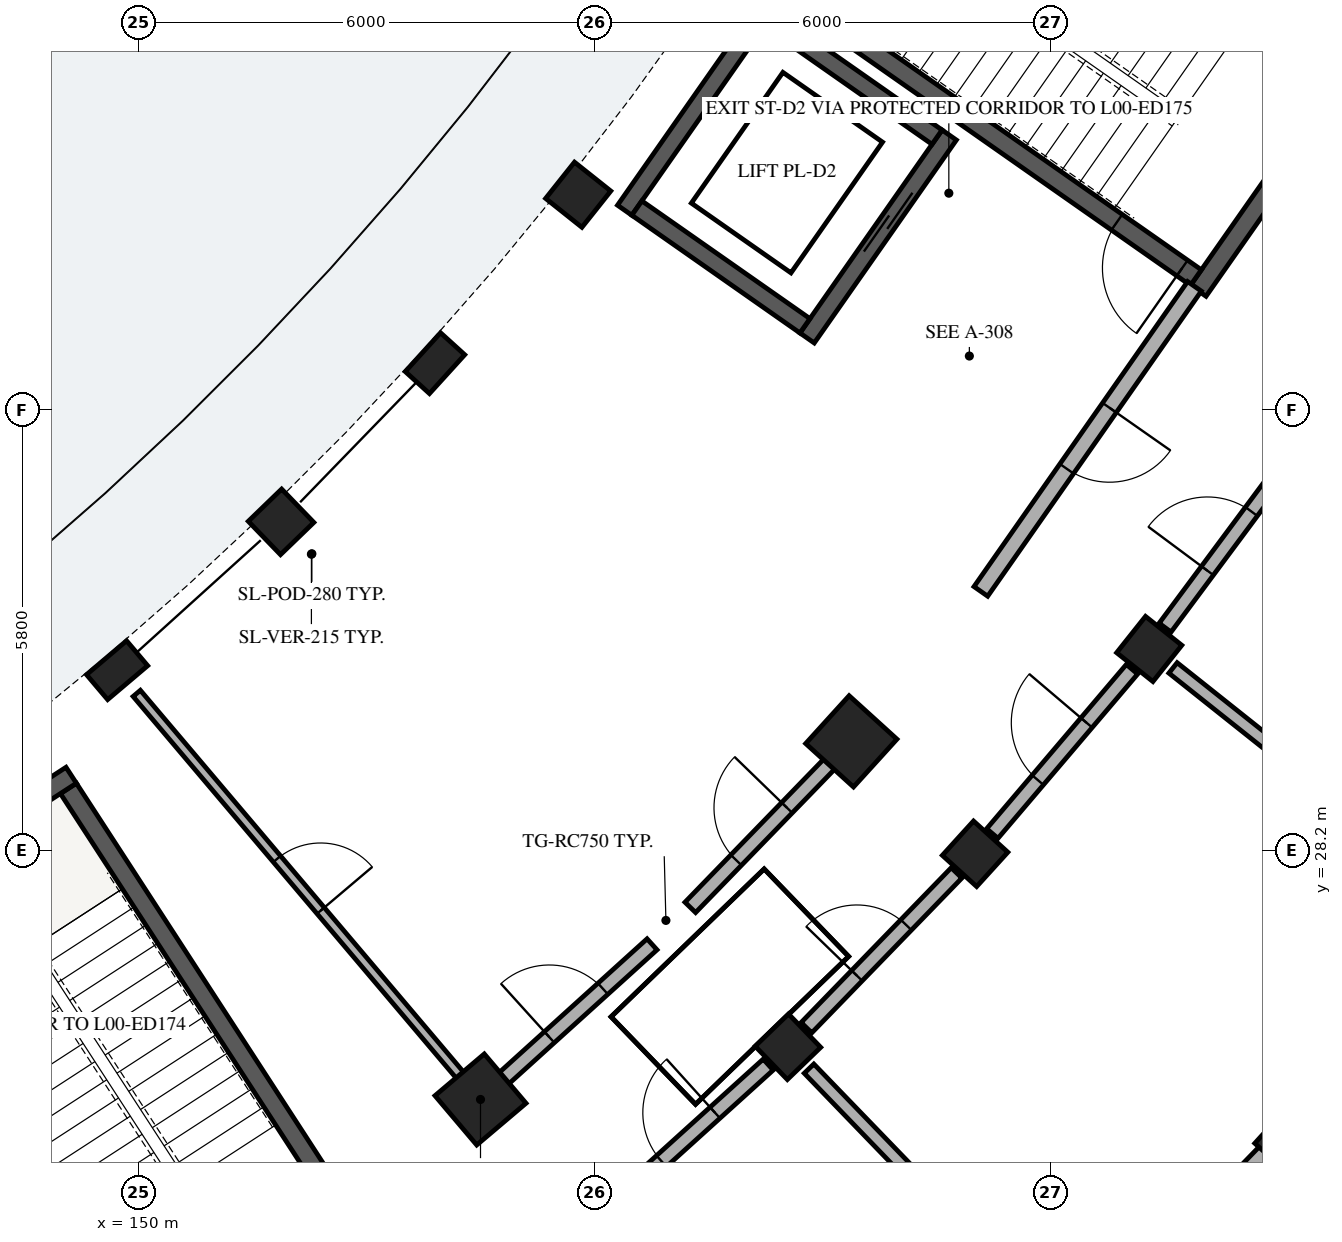
"""IFC4 building model, lengths in metres.
Left out: names, types, materials, properties, quantities, classifications, styles, units other than length and angle.
Written with IfcOpenShell. Run it as: python <this file> out.ifc"""

import sys

from ifc_helpers import new_model, si_unit, direction, frame, frame_2d, origin, origin_2d, place, context, subcontext, project, spatial, rectangle, extrude, element, fill, save


model = new_model("IFC4")
c1 = context("Model", 3, precision=1e-05, world=origin(), true_north=direction((0.0, 1.0)))
c2 = subcontext(c1, "Body", "Model", "MODEL_VIEW")
j1 = project(units=[si_unit("LENGTHUNIT", "METRE"), si_unit("PLANEANGLEUNIT", "RADIAN")], contexts=[c1])
p1 = place(None, origin())
s1 = spatial("IfcSite", under=j1, at=p1, CompositionType="ELEMENT")
p2 = place(p1, origin())
s2 = spatial("IfcBuilding", under=s1, at=p2, CompositionType="ELEMENT")
p3 = place(p2, origin())
s3 = spatial("IfcBuildingStorey", under=s2, at=p3, CompositionType="ELEMENT", Elevation=0.0)
p4 = place(p3, frame((152.674, 23.484, 0.0), z_axis=(0.0, 0.0, 1.0), x_axis=(-0.544655453679, 0.838659905312, 0.0)))
e1 = element("IfcWall", 1, at=p4, inside=s3, PredefinedType="SHEAR", context=c2, shape_type="SweptSolid", body=[
    extrude(rectangle(XDim=6.6, YDim=0.25, at=frame_2d((3.3, 0.0))), origin(), (0.0, 0.0, 1.0), 4.48),
])
p5 = place(p3, frame((149.116, 29.192, 0.0), z_axis=(0.0, 0.0, 1.0), x_axis=(-0.838699580527, -0.544594356953, 0.0)))
e2 = element("IfcWall", 2, at=p5, inside=s3, PredefinedType="SHEAR", context=c2, shape_type="SweptSolid", body=[
    extrude(rectangle(XDim=3.42, YDim=0.25, at=frame_2d((1.71, 0.0))), origin(), (0.0, 0.0, 1.0), 4.48),
])
p6 = place(p3, frame((150.015, 21.757, 0.0), z_axis=(0.0, 0.0, 1.0), x_axis=(-0.544629435258, 0.838676802022, 0.0)))
e3 = element("IfcWall", 3, at=p6, inside=s3, PredefinedType="SHEAR", context=c2, shape_type="SweptSolid", body=[
    extrude(rectangle(XDim=6.6, YDim=0.25, at=frame_2d((3.3, 0.0))), origin(), (0.0, 0.0, 1.0), 4.48),
])
p7 = place(p6, frame((0.22, 0.0, 0.0)))
e4 = element("IfcOpeningElement", 4, at=p7, cuts=e3, PredefinedType="OPENING", context=c2, shape_type="SweptSolid", body=[
    extrude(rectangle(XDim=1.05, YDim=2.15, at=frame_2d((0.525, 1.075))), frame((0.0, 0.135, 0.0), z_axis=(0.0, -1.0, 0.0), x_axis=(1.0, 0.0, 0.0)), (0.0, 0.0, 1.0), 0.27),
])
p8 = place(p3, frame((165.733, 38.336, 0.0), z_axis=(0.0, 0.0, 1.0), x_axis=(-0.819153711596, 0.573574055182, 0.0)))
e5 = element("IfcWall", 5, at=p8, inside=s3, PredefinedType="SHEAR", context=c2, shape_type="SweptSolid", body=[
    extrude(rectangle(XDim=6.6, YDim=0.25, at=frame_2d((3.3, 0.0))), origin(), (0.0, 0.0, 1.0), 4.48),
])
p9 = place(p3, frame((165.907, 38.366, 0.0), z_axis=(0.0, 0.0, 1.0), x_axis=(-0.573582112484, -0.819148069789, 0.0)))
e6 = element("IfcWall", 6, at=p9, inside=s3, PredefinedType="SHEAR", context=c2, shape_type="SweptSolid", body=[
    extrude(rectangle(XDim=3.42, YDim=0.25, at=frame_2d((1.71, 0.0))), origin(), (0.0, 0.0, 1.0), 4.48),
])
p10 = place(p3, frame((163.914, 35.739, 0.0), z_axis=(0.0, 0.0, 1.0), x_axis=(-0.819153711596, 0.573574055182, 0.0)))
e7 = element("IfcWall", 7, at=p10, inside=s3, PredefinedType="SHEAR", context=c2, shape_type="SweptSolid", body=[
    extrude(rectangle(XDim=6.6, YDim=0.25, at=frame_2d((3.3, 0.0))), origin(), (0.0, 0.0, 1.0), 4.48),
])
p11 = place(p10, frame((0.22, 0.0, 0.0)))
e8 = element("IfcOpeningElement", 8, at=p11, cuts=e7, PredefinedType="OPENING", context=c2, shape_type="SweptSolid", body=[
    extrude(rectangle(XDim=1.05, YDim=2.15, at=frame_2d((0.525, 1.075))), frame((0.0, 0.135, 0.0), z_axis=(0.0, -1.0, 0.0), x_axis=(1.0, 0.0, 0.0)), (0.0, 0.0, 1.0), 0.27),
])
p12 = place(p3, frame((160.668, 37.615, 0.0), z_axis=(0.0, 0.0, 1.0), x_axis=(-0.573582966431, -0.819147471839, 0.0)))
e9 = element("IfcWall", 9, at=p12, inside=s3, PredefinedType="SHEAR", context=c2, shape_type="SweptSolid", body=[
    extrude(rectangle(XDim=3.26, YDim=0.23, at=frame_2d((1.63, 0.0))), origin(), (0.0, 0.0, 1.0), 4.48),
])
p13 = place(p12, frame((0.9, 0.0, 0.0)))
e10 = element("IfcOpeningElement", 10, at=p13, cuts=e9, PredefinedType="OPENING", context=c2, shape_type="SweptSolid", body=[
    extrude(rectangle(XDim=1.0, YDim=2.15, at=frame_2d((0.5, 1.075))), frame((0.0, 0.125, 0.0), z_axis=(0.0, -1.0, 0.0), x_axis=(1.0, 0.0, 0.0)), (0.0, 0.0, 1.0), 0.25),
])
p14 = place(p3, frame((158.268, 39.296, 0.0), z_axis=(0.0, 0.0, 1.0), x_axis=(-0.573582966431, -0.819147471839, 0.0)))
e11 = element("IfcWall", 11, at=p14, inside=s3, PredefinedType="SHEAR", context=c2, shape_type="SweptSolid", body=[
    extrude(rectangle(XDim=3.26, YDim=0.23, at=frame_2d((1.63, 0.0))), origin(), (0.0, 0.0, 1.0), 4.48),
])
p15 = place(p3, frame((160.508, 37.587, 0.0), z_axis=(0.0, 0.0, 1.0), x_axis=(-0.819189439894, 0.573523026186, 0.0)))
e12 = element("IfcWall", 12, at=p15, inside=s3, PredefinedType="SHEAR", context=c2, shape_type="SweptSolid", body=[
    extrude(rectangle(XDim=2.7, YDim=0.23, at=frame_2d((1.35, 0.0))), origin(), (0.0, 0.0, 1.0), 4.48),
])
p16 = place(p3, frame((158.77, 35.105, 0.0), z_axis=(0.0, 0.0, 1.0), x_axis=(-0.819117209968, 0.573626181702, 0.0)))
e13 = element("IfcWall", 13, at=p16, inside=s3, PredefinedType="SHEAR", context=c2, shape_type="SweptSolid", body=[
    extrude(rectangle(XDim=2.7, YDim=0.23, at=frame_2d((1.35, 0.0))), origin(), (0.0, 0.0, 1.0), 4.48),
])
p17 = place(p3, frame((149.72, 30.574, 0.0), z_axis=(0.0, 0.0, 1.0), x_axis=(0.646123979643, -0.763232469783, 0.0)))
e14 = element("IfcColumn", 14, at=p17, inside=s3, PredefinedType="PILASTER", context=c2, shape_type="SweptSolid", body=[
    extrude(rectangle(XDim=0.43, YDim=0.69, at=origin_2d()), origin(), (0.0, 0.0, 1.0), 4.485),
])
p18 = place(p3, frame((154.501, 24.927, 0.0), z_axis=(0.0, 0.0, 1.0), x_axis=(0.646123979643, -0.763232469783, 0.0)))
e15 = element("IfcColumn", 15, at=p18, inside=s3, PredefinedType="COLUMN", context=c2, shape_type="SweptSolid", body=[
    extrude(rectangle(XDim=0.85, YDim=0.85, at=origin_2d()), origin(), (0.0, 0.0, 1.0), 4.485),
])
for number, where, z_axis, x_axis in (
    (16, (151.878, 32.525, 0.0), (0.0, 0.0, 1.0), (0.695, -0.719, 0.0)),
    (17, (158.546, 25.62, 0.0), (0.0, 0.0, 1.0), (0.695, -0.719, 0.0)),
):
    element("IfcColumn", number, at=place(p3, frame(where, z_axis=z_axis, x_axis=x_axis)), inside=s3, PredefinedType="COLUMN", context=c2, shape_type="SweptSolid", body=[
        extrude(rectangle(XDim=0.61, YDim=0.61, at=origin_2d()), origin(), (0.0, 0.0, 1.0), 4.485),
    ])
p19 = place(p3, frame((153.903, 34.613, 0.0), z_axis=(0.0, 0.0, 1.0), x_axis=(0.740218127487, -0.672366807435, 0.0)))
e18 = element("IfcColumn", 18, at=p19, inside=s3, PredefinedType="PILASTER", context=c2, shape_type="SweptSolid", body=[
    extrude(rectangle(XDim=0.43, YDim=0.69, at=origin_2d()), origin(), (0.0, 0.0, 1.0), 4.485),
])
p20 = place(p3, frame((159.38, 29.638, 0.0), z_axis=(0.0, 0.0, 1.0), x_axis=(0.740218127487, -0.672366807435, 0.0)))
e19 = element("IfcColumn", 19, at=p20, inside=s3, PredefinedType="COLUMN", context=c2, shape_type="SweptSolid", body=[
    extrude(rectangle(XDim=0.85, YDim=0.85, at=origin_2d()), origin(), (0.0, 0.0, 1.0), 4.485),
])
p21 = place(p3, frame((161.009, 28.159, 0.0), z_axis=(0.0, 0.0, 1.0), x_axis=(0.740218127487, -0.672366807435, 0.0)))
e20 = element("IfcColumn", 20, at=p21, inside=s3, PredefinedType="COLUMN", context=c2, shape_type="SweptSolid", body=[
    extrude(rectangle(XDim=0.61, YDim=0.61, at=origin_2d()), origin(), (0.0, 0.0, 1.0), 4.485),
])
p22 = place(p3, frame((165.08, 24.46, 0.0), z_axis=(0.0, 0.0, 1.0), x_axis=(0.740218127487, -0.672366807435, 0.0)))
e21 = element("IfcColumn", 21, at=p22, inside=s3, PredefinedType="PILASTER", context=c2, shape_type="SweptSolid", body=[
    extrude(rectangle(XDim=0.43, YDim=0.69, at=origin_2d()), origin(), (0.0, 0.0, 1.0), 4.485),
])
for number, where, z_axis, x_axis in (
    (22, (155.787, 36.829, 0.0), (0.0, 0.0, 1.0), (0.783, -0.623, 0.0)),
    (23, (163.3, 30.853, 0.0), (0.0, 0.0, 1.0), (0.783, -0.623, 0.0)),
):
    element("IfcColumn", number, at=place(p3, frame(where, z_axis=z_axis, x_axis=x_axis)), inside=s3, PredefinedType="COLUMN", context=c2, shape_type="SweptSolid", body=[
        extrude(rectangle(XDim=0.61, YDim=0.61, at=origin_2d()), origin(), (0.0, 0.0, 1.0), 4.485),
    ])
p23 = place(p3, frame((162.558, 21.861, 0.0), z_axis=(0.0, 0.0, 1.0), x_axis=(0.696226819082, 0.717821855609, 0.0)))
e24 = element("IfcWall", 24, at=p23, inside=s3, PredefinedType="SOLIDWALL", context=c2, shape_type="SweptSolid", body=[
    extrude(rectangle(XDim=3.437, YDim=0.26, at=frame_2d((1.718, 0.0))), origin(), (0.0, 0.0, 1.0), 3.755),
])
p24 = place(p23, frame((1.068, 0.0, 0.55)))
e25 = element("IfcOpeningElement", 25, at=p24, cuts=e24, PredefinedType="OPENING", context=c2, shape_type="SweptSolid", body=[
    extrude(rectangle(XDim=1.3, YDim=1.6, at=frame_2d((0.65, 0.8))), frame((0.0, 0.14, 0.0), z_axis=(0.0, -1.0, 0.0), x_axis=(1.0, 0.0, 0.0)), (0.0, 0.0, 1.0), 0.28),
])
p25 = place(p3, frame((163.895, 35.624, 0.0), z_axis=(0.0, 0.0, 1.0), x_axis=(-0.573572687386, -0.819154669329, 0.0)))
e26 = element("IfcWall", 26, at=p25, inside=s3, PredefinedType="PARTITIONING", context=c2, shape_type="SweptSolid", body=[
    extrude(rectangle(XDim=4.9, YDim=0.22, at=frame_2d((2.45, 0.0))), origin(), (0.0, 0.0, 1.0), 3.74),
])
p26 = place(p25, frame((1.95, 0.0, 0.0)))
e27 = element("IfcOpeningElement", 27, at=p26, cuts=e26, PredefinedType="OPENING", context=c2, shape_type="SweptSolid", body=[
    extrude(rectangle(XDim=0.98, YDim=2.14, at=frame_2d((0.49, 1.07))), frame((0.0, 0.12, 0.0), z_axis=(0.0, -1.0, 0.0), x_axis=(1.0, 0.0, 0.0)), (0.0, 0.0, 1.0), 0.24),
])
p27 = place(p3, frame((149.979, 30.269, 0.0), z_axis=(0.0, 0.0, 1.0), x_axis=(0.646121311019, -0.763234728932, 0.0)))
e28 = element("IfcWall", 28, at=p27, inside=s3, PredefinedType="PARTITIONING", context=c2, shape_type="SweptSolid", body=[
    extrude(rectangle(XDim=6.6, YDim=0.125, at=frame_2d((3.3, 0.0))), origin(), (0.0, 0.0, 1.0), 3.1),
])
p28 = place(p27, frame((2.855, 0.0, 0.0)))
e29 = element("IfcOpeningElement", 29, at=p28, cuts=e28, PredefinedType="OPENING", context=c2, shape_type="SweptSolid", body=[
    extrude(rectangle(XDim=0.89, YDim=2.1, at=frame_2d((0.445, 1.05))), frame((0.0, 0.073, 0.0), z_axis=(0.0, -1.0, 0.0), x_axis=(1.0, 0.0, 0.0)), (0.0, 0.0, 1.0), 0.145),
])
p29 = place(p3, frame((156.183, 23.482, 0.0), z_axis=(0.0, 0.0, 1.0), x_axis=(0.741631592147, 0.670807410163, 0.0)))
e30 = element("IfcWall", 30, at=p29, inside=s3, PredefinedType="PARTITIONING", context=c2, shape_type="SweptSolid", body=[
    extrude(rectangle(XDim=2.837, YDim=0.195, at=frame_2d((1.418, 0.0))), origin(), (0.0, 0.0, 1.0), 3.1),
])
p30 = place(p29, frame((0.944, 0.0, 0.0)))
e31 = element("IfcOpeningElement", 31, at=p30, cuts=e30, PredefinedType="OPENING", context=c2, shape_type="SweptSolid", body=[
    extrude(rectangle(XDim=0.95, YDim=2.13, at=frame_2d((0.475, 1.065))), frame((0.0, 0.107, 0.0), z_axis=(0.0, -1.0, 0.0), x_axis=(1.0, 0.0, 0.0)), (0.0, 0.0, 1.0), 0.215),
])
p31 = place(p3, frame((154.761, 25.161, 0.0), z_axis=(0.0, 0.0, 1.0), x_axis=(0.74166462946, 0.670770882945, 0.0)))
e32 = element("IfcWall", 32, at=p31, inside=s3, PredefinedType="PARTITIONING", context=c2, shape_type="SweptSolid", body=[
    extrude(rectangle(XDim=2.693, YDim=0.195, at=frame_2d((1.347, 0.0))), origin(), (0.0, 0.0, 1.0), 3.1),
])
p32 = place(p31, frame((0.872, 0.0, 0.0)))
e33 = element("IfcOpeningElement", 33, at=p32, cuts=e32, PredefinedType="OPENING", context=c2, shape_type="SweptSolid", body=[
    extrude(rectangle(XDim=0.95, YDim=2.13, at=frame_2d((0.475, 1.065))), frame((0.0, 0.107, 0.0), z_axis=(0.0, -1.0, 0.0), x_axis=(1.0, 0.0, 0.0)), (0.0, 0.0, 1.0), 0.215),
])
p33 = place(p3, frame((158.824, 25.332, 0.0), z_axis=(0.0, 0.0, 1.0), x_axis=(0.69466218314, -0.719336118456, 0.0)))
e34 = element("IfcWall", 34, at=p33, inside=s3, PredefinedType="PARTITIONING", context=c2, shape_type="SweptSolid", body=[
    extrude(rectangle(XDim=4.7, YDim=0.175, at=frame_2d((2.35, 0.0))), origin(), (0.0, 0.0, 1.0), 3.1),
])
p34 = place(p3, frame((158.79, 25.871, 0.0), z_axis=(0.0, 0.0, 1.0), x_axis=(0.696223786753, 0.717824796701, 0.0)))
e35 = element("IfcWall", 35, at=p34, inside=s3, PredefinedType="PARTITIONING", context=c2, shape_type="SweptSolid", body=[
    extrude(rectangle(XDim=2.837, YDim=0.195, at=frame_2d((1.418, 0.0))), origin(), (0.0, 0.0, 1.0), 3.1),
])
p35 = place(p34, frame((0.954, 0.0, 0.0)))
e36 = element("IfcOpeningElement", 36, at=p35, cuts=e35, PredefinedType="OPENING", context=c2, shape_type="SweptSolid", body=[
    extrude(rectangle(XDim=0.93, YDim=2.12, at=frame_2d((0.465, 1.06))), frame((0.0, 0.107, 0.0), z_axis=(0.0, -1.0, 0.0), x_axis=(1.0, 0.0, 0.0)), (0.0, 0.0, 1.0), 0.215),
])
p36 = place(p3, frame((157.262, 27.453, 0.0), z_axis=(0.0, 0.0, 1.0), x_axis=(0.696236443412, 0.717812520694, 0.0)))
e37 = element("IfcWall", 37, at=p36, inside=s3, PredefinedType="PARTITIONING", context=c2, shape_type="SweptSolid", body=[
    extrude(rectangle(XDim=2.693, YDim=0.195, at=frame_2d((1.347, 0.0))), origin(), (0.0, 0.0, 1.0), 3.1),
])
p37 = place(p36, frame((0.866, 0.0, 0.0)))
e38 = element("IfcOpeningElement", 38, at=p37, cuts=e37, PredefinedType="OPENING", context=c2, shape_type="SweptSolid", body=[
    extrude(rectangle(XDim=0.96, YDim=2.1, at=frame_2d((0.48, 1.05))), frame((0.0, 0.107, 0.0), z_axis=(0.0, -1.0, 0.0), x_axis=(1.0, 0.0, 0.0)), (0.0, 0.0, 1.0), 0.215),
])
p38 = place(p3, frame((161.236, 28.425, 0.0), z_axis=(0.0, 0.0, 1.0), x_axis=(0.64778830669, 0.761820392032, 0.0)))
e39 = element("IfcWall", 39, at=p38, inside=s3, PredefinedType="PARTITIONING", context=c2, shape_type="SweptSolid", body=[
    extrude(rectangle(XDim=2.837, YDim=0.195, at=frame_2d((1.418, 0.0))), origin(), (0.0, 0.0, 1.0), 3.1),
])
p39 = place(p38, frame((0.924, 0.0, 0.0)))
e40 = element("IfcOpeningElement", 40, at=p39, cuts=e39, PredefinedType="OPENING", context=c2, shape_type="SweptSolid", body=[
    extrude(rectangle(XDim=0.99, YDim=2.16, at=frame_2d((0.495, 1.08))), frame((0.0, 0.107, 0.0), z_axis=(0.0, -1.0, 0.0), x_axis=(1.0, 0.0, 0.0)), (0.0, 0.0, 1.0), 0.215),
])
p40 = place(p3, frame((163.613, 30.604, 0.0), z_axis=(0.0, 0.0, 1.0), x_axis=(0.782609106384, -0.622513442911, 0.0)))
e41 = element("IfcWall", 41, at=p40, inside=s3, PredefinedType="PARTITIONING", context=c2, shape_type="SweptSolid", body=[
    extrude(rectangle(XDim=4.7, YDim=0.175, at=frame_2d((2.35, 0.0))), origin(), (0.0, 0.0, 1.0), 3.1),
])
p41 = place(p3, frame((163.509, 31.134, 0.0), z_axis=(0.0, 0.0, 1.0), x_axis=(0.596552136601, 0.802574325727, 0.0)))
e42 = element("IfcWall", 42, at=p41, inside=s3, PredefinedType="PARTITIONING", context=c2, shape_type="SweptSolid", body=[
    extrude(rectangle(XDim=2.837, YDim=0.195, at=frame_2d((1.418, 0.0))), origin(), (0.0, 0.0, 1.0), 3.1),
])
p42 = place(p41, frame((0.934, 0.0, 0.0)))
e43 = element("IfcOpeningElement", 43, at=p42, cuts=e42, PredefinedType="OPENING", context=c2, shape_type="SweptSolid", body=[
    extrude(rectangle(XDim=0.97, YDim=2.15, at=frame_2d((0.485, 1.075))), frame((0.0, 0.107, 0.0), z_axis=(0.0, -1.0, 0.0), x_axis=(1.0, 0.0, 0.0)), (0.0, 0.0, 1.0), 0.215),
])
p43 = place(p11, origin())
e44 = element("IfcDoor", 44, at=p43, inside=s3, OperationType="SINGLE_SWING_LEFT", PredefinedType="DOOR", context=c2, shape_type="SweptSolid", body=[
    extrude(rectangle(XDim=1.05, YDim=2.15, at=frame_2d((0.525, 1.075))), frame((0.0, 0.025, 0.0), z_axis=(0.0, -1.0, 0.0), x_axis=(1.0, 0.0, 0.0)), (0.0, 0.0, 1.0), 0.05),
])
fill(e8, e44)
p44 = place(p13, origin())
e45 = element("IfcDoor", 45, at=p44, inside=s3, OperationType="DOUBLE_DOOR_SLIDING", PredefinedType="DOOR", context=c2, shape_type="SweptSolid", body=[
    extrude(rectangle(XDim=1.0, YDim=2.15, at=frame_2d((0.5, 1.075))), frame((0.0, 0.025, 0.0), z_axis=(0.0, -1.0, 0.0), x_axis=(1.0, 0.0, 0.0)), (0.0, 0.0, 1.0), 0.05),
])
fill(e10, e45)
p45 = place(p26, origin())
e46 = element("IfcDoor", 46, at=p45, inside=s3, OperationType="SINGLE_SWING_LEFT", PredefinedType="DOOR", context=c2, shape_type="SweptSolid", body=[
    extrude(rectangle(XDim=0.98, YDim=2.14, at=frame_2d((0.49, 1.07))), frame((0.0, 0.025, 0.0), z_axis=(0.0, -1.0, 0.0), x_axis=(1.0, 0.0, 0.0)), (0.0, 0.0, 1.0), 0.05),
])
fill(e27, e46)
p46 = place(p28, origin())
e47 = element("IfcDoor", 47, at=p46, inside=s3, OperationType="SINGLE_SWING_RIGHT", PredefinedType="DOOR", context=c2, shape_type="SweptSolid", body=[
    extrude(rectangle(XDim=0.89, YDim=2.1, at=frame_2d((0.445, 1.05))), frame((0.0, 0.025, 0.0), z_axis=(0.0, -1.0, 0.0), x_axis=(1.0, 0.0, 0.0)), (0.0, 0.0, 1.0), 0.05),
])
fill(e29, e47)
p47 = place(p30, origin())
e48 = element("IfcDoor", 48, at=p47, inside=s3, OperationType="SINGLE_SWING_RIGHT", PredefinedType="DOOR", context=c2, shape_type="SweptSolid", body=[
    extrude(rectangle(XDim=0.95, YDim=2.13, at=frame_2d((0.475, 1.065))), frame((0.0, 0.025, 0.0), z_axis=(0.0, -1.0, 0.0), x_axis=(1.0, 0.0, 0.0)), (0.0, 0.0, 1.0), 0.05),
])
fill(e31, e48)
p48 = place(p32, origin())
e49 = element("IfcDoor", 49, at=p48, inside=s3, OperationType="SINGLE_SWING_LEFT", PredefinedType="DOOR", context=c2, shape_type="SweptSolid", body=[
    extrude(rectangle(XDim=0.95, YDim=2.13, at=frame_2d((0.475, 1.065))), frame((0.0, 0.025, 0.0), z_axis=(0.0, -1.0, 0.0), x_axis=(1.0, 0.0, 0.0)), (0.0, 0.0, 1.0), 0.05),
])
fill(e33, e49)
p49 = place(p35, origin())
e50 = element("IfcDoor", 50, at=p49, inside=s3, OperationType="SINGLE_SWING_LEFT", PredefinedType="DOOR", context=c2, shape_type="SweptSolid", body=[
    extrude(rectangle(XDim=0.93, YDim=2.12, at=frame_2d((0.465, 1.06))), frame((0.0, 0.025, 0.0), z_axis=(0.0, -1.0, 0.0), x_axis=(1.0, 0.0, 0.0)), (0.0, 0.0, 1.0), 0.05),
])
fill(e36, e50)
p50 = place(p37, origin())
e51 = element("IfcDoor", 51, at=p50, inside=s3, OperationType="SINGLE_SWING_RIGHT", PredefinedType="DOOR", context=c2, shape_type="SweptSolid", body=[
    extrude(rectangle(XDim=0.96, YDim=2.1, at=frame_2d((0.48, 1.05))), frame((0.0, 0.025, 0.0), z_axis=(0.0, -1.0, 0.0), x_axis=(1.0, 0.0, 0.0)), (0.0, 0.0, 1.0), 0.05),
])
fill(e38, e51)
p51 = place(p39, origin())
e52 = element("IfcDoor", 52, at=p51, inside=s3, OperationType="SINGLE_SWING_RIGHT", PredefinedType="DOOR", context=c2, shape_type="SweptSolid", body=[
    extrude(rectangle(XDim=0.99, YDim=2.16, at=frame_2d((0.495, 1.08))), frame((0.0, 0.025, 0.0), z_axis=(0.0, -1.0, 0.0), x_axis=(1.0, 0.0, 0.0)), (0.0, 0.0, 1.0), 0.05),
])
fill(e40, e52)
p52 = place(p42, origin())
e53 = element("IfcDoor", 53, at=p52, inside=s3, OperationType="SINGLE_SWING_LEFT", PredefinedType="DOOR", context=c2, shape_type="SweptSolid", body=[
    extrude(rectangle(XDim=0.97, YDim=2.15, at=frame_2d((0.485, 1.075))), frame((0.0, 0.025, 0.0), z_axis=(0.0, -1.0, 0.0), x_axis=(1.0, 0.0, 0.0)), (0.0, 0.0, 1.0), 0.05),
])
fill(e43, e53)
save(model, sys.argv[1])
